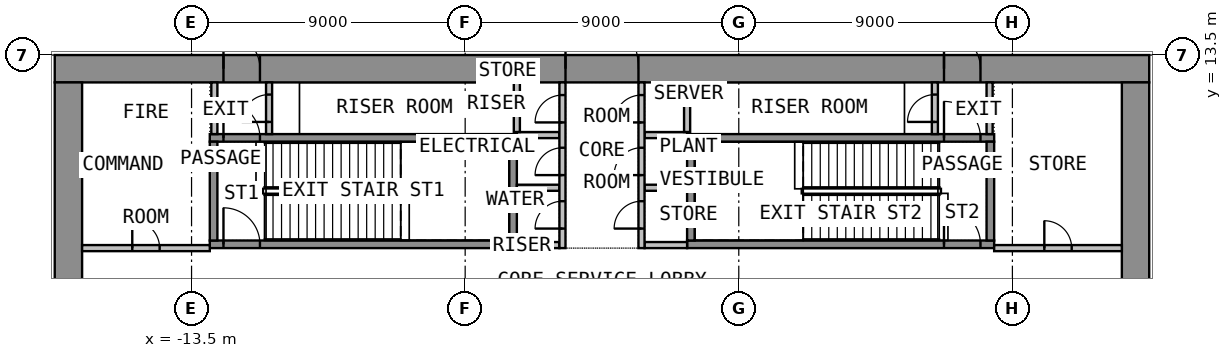
"""IFC4 building model, lengths in metres.
Left out: names, types, materials, properties, quantities, classifications, styles, units other than length and angle.
Written with IfcOpenShell. Run it as: python <this file> out.ifc"""

import sys

from ifc_helpers import new_model, si_unit, direction, frame, frame_2d, origin, place, context, subcontext, project, spatial, rectangle, extrude, element, fill, save


model = new_model("IFC4")
c1 = context("Model", 3, precision=1e-05, world=origin(), true_north=direction((0.0, 1.0)))
c2 = subcontext(c1, "Body", "Model", "MODEL_VIEW")
j1 = project(units=[si_unit("LENGTHUNIT", "METRE"), si_unit("PLANEANGLEUNIT", "RADIAN")], contexts=[c1])
p1 = place(None, origin())
s1 = spatial("IfcSite", under=j1, at=p1, CompositionType="ELEMENT")
p2 = place(p1, origin())
s2 = spatial("IfcBuilding", under=s1, at=p2, CompositionType="ELEMENT")
p3 = place(p2, origin())
s3 = spatial("IfcBuildingStorey", under=s2, at=p3, CompositionType="ELEMENT", Elevation=0.0)
p4 = place(p3, frame((-18.0, 13.05, 0.0), z_axis=(0.0, 0.0, 1.0), x_axis=(1.0, 0.0, 0.0)))
e1 = element("IfcWall", 1, at=p4, inside=s3, PredefinedType="SHEAR", context=c2, shape_type="SweptSolid", body=[
    extrude(rectangle(XDim=36.0, YDim=0.9, at=frame_2d((18.0, 0.0))), origin(), (0.0, 0.0, 1.0), 5.6),
])
p5 = place(p4, frame((16.8, 0.0, 0.0)))
e2 = element("IfcOpeningElement", 2, at=p5, cuts=e1, PredefinedType="OPENING", context=c2, shape_type="SweptSolid", body=[
    extrude(rectangle(XDim=2.4, YDim=2.1, at=frame_2d((1.2, 1.05))), frame((0.0, 0.46, 0.0), z_axis=(0.0, -1.0, 0.0), x_axis=(1.0, 0.0, 0.0)), (0.0, 0.0, 1.0), 0.92),
])
p6 = place(p4, frame((5.55, 0.0, 0.0)))
e3 = element("IfcOpeningElement", 3, at=p6, cuts=e1, PredefinedType="OPENING", context=c2, shape_type="SweptSolid", body=[
    extrude(rectangle(XDim=1.2, YDim=2.1, at=frame_2d((0.6, 1.05))), frame((0.0, 0.46, 0.0), z_axis=(0.0, -1.0, 0.0), x_axis=(1.0, 0.0, 0.0)), (0.0, 0.0, 1.0), 0.92),
])
p7 = place(p4, frame((29.25, 0.0, 0.0)))
e4 = element("IfcOpeningElement", 4, at=p7, cuts=e1, PredefinedType="OPENING", context=c2, shape_type="SweptSolid", body=[
    extrude(rectangle(XDim=1.2, YDim=2.1, at=frame_2d((0.6, 1.05))), frame((0.0, 0.46, 0.0), z_axis=(0.0, -1.0, 0.0), x_axis=(1.0, 0.0, 0.0)), (0.0, 0.0, 1.0), 0.92),
])
p8 = place(p3, frame((-17.55, -12.6, 0.0), z_axis=(0.0, 0.0, 1.0), x_axis=(0.0, 1.0, 0.0)))
e5 = element("IfcWall", 5, at=p8, inside=s3, PredefinedType="SHEAR", context=c2, shape_type="SweptSolid", body=[
    extrude(rectangle(XDim=25.2, YDim=0.9, at=frame_2d((12.6, 0.0))), origin(), (0.0, 0.0, 1.0), 5.6),
])
p9 = place(p8, frame((11.4, 0.0, 0.0)))
e6 = element("IfcOpeningElement", 6, at=p9, cuts=e5, PredefinedType="OPENING", context=c2, shape_type="SweptSolid", body=[
    extrude(rectangle(XDim=2.4, YDim=2.1, at=frame_2d((1.2, 1.05))), frame((0.0, 0.46, 0.0), z_axis=(0.0, -1.0, 0.0), x_axis=(1.0, 0.0, 0.0)), (0.0, 0.0, 1.0), 0.92),
])
p10 = place(p3, frame((17.55, -12.6, 0.0), z_axis=(0.0, 0.0, 1.0), x_axis=(0.0, 1.0, 0.0)))
e7 = element("IfcWall", 7, at=p10, inside=s3, PredefinedType="SHEAR", context=c2, shape_type="SweptSolid", body=[
    extrude(rectangle(XDim=25.2, YDim=0.9, at=frame_2d((12.6, 0.0))), origin(), (0.0, 0.0, 1.0), 5.6),
])
p11 = place(p10, frame((11.4, 0.0, 0.0)))
e8 = element("IfcOpeningElement", 8, at=p11, cuts=e7, PredefinedType="OPENING", context=c2, shape_type="SweptSolid", body=[
    extrude(rectangle(XDim=2.4, YDim=2.1, at=frame_2d((1.2, 1.05))), frame((0.0, 0.46, 0.0), z_axis=(0.0, -1.0, 0.0), x_axis=(1.0, 0.0, 0.0)), (0.0, 0.0, 1.0), 0.92),
])
p12 = place(p3, frame((-12.9, 7.275, 0.0), z_axis=(0.0, 0.0, 1.0), x_axis=(1.0, 0.0, 0.0)))
e9 = element("IfcWall", 9, at=p12, inside=s3, PredefinedType="SHEAR", context=c2, shape_type="SweptSolid", body=[
    extrude(rectangle(XDim=10.1, YDim=0.25, at=frame_2d((5.05, 0.0))), origin(), (0.0, 0.0, 1.0), 5.6),
])
p13 = place(p12, frame((0.45, 0.0, 0.0)))
e10 = element("IfcOpeningElement", 10, at=p13, cuts=e9, PredefinedType="OPENING", context=c2, shape_type="SweptSolid", body=[
    extrude(rectangle(XDim=1.2, YDim=2.1, at=frame_2d((0.6, 1.05))), frame((0.0, 0.135, 0.0), z_axis=(0.0, -1.0, 0.0), x_axis=(1.0, 0.0, 0.0)), (0.0, 0.0, 1.0), 0.27),
])
p14 = place(p3, frame((-12.9, 10.775, 0.0), z_axis=(0.0, 0.0, 1.0), x_axis=(1.0, 0.0, 0.0)))
e11 = element("IfcWall", 11, at=p14, inside=s3, PredefinedType="SHEAR", context=c2, shape_type="SweptSolid", body=[
    extrude(rectangle(XDim=10.1, YDim=0.25, at=frame_2d((5.05, 0.0))), origin(), (0.0, 0.0, 1.0), 5.6),
])
p15 = place(p14, frame((0.45, 0.0, 0.0)))
e12 = element("IfcOpeningElement", 12, at=p15, cuts=e11, PredefinedType="OPENING", context=c2, shape_type="SweptSolid", body=[
    extrude(rectangle(XDim=1.2, YDim=2.1, at=frame_2d((0.6, 1.05))), frame((0.0, 0.135, 0.0), z_axis=(0.0, -1.0, 0.0), x_axis=(1.0, 0.0, 0.0)), (0.0, 0.0, 1.0), 0.27),
])
for number, where, z_axis, x_axis in (
    (13, (-12.775, 7.4, 0.0), (0.0, 0.0, 1.0), (0.0, 1.0, 0.0)),
    (14, (-2.925, 7.4, 0.0), (0.0, 0.0, 1.0), (0.0, 1.0, 0.0)),
):
    element("IfcWall", number, at=place(p3, frame(where, z_axis=z_axis, x_axis=x_axis)), inside=s3, PredefinedType="SHEAR", context=c2, shape_type="SweptSolid", body=[
        extrude(rectangle(XDim=3.25, YDim=0.25, at=frame_2d((1.625, 0.0))), origin(), (0.0, 0.0, 1.0), 5.6),
    ])
p16 = place(p3, frame((2.8, 7.275, 0.0), z_axis=(0.0, 0.0, 1.0), x_axis=(1.0, 0.0, 0.0)))
e15 = element("IfcWall", 15, at=p16, inside=s3, PredefinedType="SHEAR", context=c2, shape_type="SweptSolid", body=[
    extrude(rectangle(XDim=10.1, YDim=0.25, at=frame_2d((5.05, 0.0))), origin(), (0.0, 0.0, 1.0), 5.6),
])
p17 = place(p16, frame((8.45, 0.0, 0.0)))
e16 = element("IfcOpeningElement", 16, at=p17, cuts=e15, PredefinedType="OPENING", context=c2, shape_type="SweptSolid", body=[
    extrude(rectangle(XDim=1.2, YDim=2.1, at=frame_2d((0.6, 1.05))), frame((0.0, 0.135, 0.0), z_axis=(0.0, -1.0, 0.0), x_axis=(1.0, 0.0, 0.0)), (0.0, 0.0, 1.0), 0.27),
])
p18 = place(p3, frame((2.8, 10.775, 0.0), z_axis=(0.0, 0.0, 1.0), x_axis=(1.0, 0.0, 0.0)))
e17 = element("IfcWall", 17, at=p18, inside=s3, PredefinedType="SHEAR", context=c2, shape_type="SweptSolid", body=[
    extrude(rectangle(XDim=10.1, YDim=0.25, at=frame_2d((5.05, 0.0))), origin(), (0.0, 0.0, 1.0), 5.6),
])
p19 = place(p18, frame((8.45, 0.0, 0.0)))
e18 = element("IfcOpeningElement", 18, at=p19, cuts=e17, PredefinedType="OPENING", context=c2, shape_type="SweptSolid", body=[
    extrude(rectangle(XDim=1.2, YDim=2.1, at=frame_2d((0.6, 1.05))), frame((0.0, 0.135, 0.0), z_axis=(0.0, -1.0, 0.0), x_axis=(1.0, 0.0, 0.0)), (0.0, 0.0, 1.0), 0.27),
])
for number, where, z_axis, x_axis in (
    (19, (2.925, 7.4, 0.0), (0.0, 0.0, 1.0), (0.0, 1.0, 0.0)),
    (20, (12.775, 7.4, 0.0), (0.0, 0.0, 1.0), (0.0, 1.0, 0.0)),
):
    element("IfcWall", number, at=place(p3, frame(where, z_axis=z_axis, x_axis=x_axis)), inside=s3, PredefinedType="SHEAR", context=c2, shape_type="SweptSolid", body=[
        extrude(rectangle(XDim=3.25, YDim=0.25, at=frame_2d((1.625, 0.0))), origin(), (0.0, 0.0, 1.0), 5.6),
    ])
for number, where, z_axis, x_axis in (
    (21, (-2.8, 7.25, 0.0), (0.0, 0.0, 1.0), (1.0, 0.0, 0.0)),
    (22, (-2.8, 9.135, 0.0), (0.0, 0.0, 1.0), (1.0, 0.0, 0.0)),
    (23, (-2.8, 10.867, 0.0), (0.0, 0.0, 1.0), (1.0, 0.0, 0.0)),
    (24, (1.4, 7.25, 0.0), (0.0, 0.0, 1.0), (1.0, 0.0, 0.0)),
    (25, (1.4, 9.135, 0.0), (0.0, 0.0, 1.0), (1.0, 0.0, 0.0)),
    (26, (1.4, 10.867, 0.0), (0.0, 0.0, 1.0), (1.0, 0.0, 0.0)),
):
    element("IfcWall", number, at=place(p3, frame(where, z_axis=z_axis, x_axis=x_axis)), inside=s3, PredefinedType="PARTITIONING", context=c2, shape_type="SweptSolid", body=[
        extrude(rectangle(XDim=1.4, YDim=0.2, at=frame_2d((0.7, 0.0))), origin(), (0.0, 0.0, 1.0), 5.6),
    ])
p20 = place(p3, frame((-1.3, 7.15, 0.0), z_axis=(0.0, 0.0, 1.0), x_axis=(0.0, 1.0, 0.0)))
e27 = element("IfcWall", 27, at=p20, inside=s3, PredefinedType="PARTITIONING", context=c2, shape_type="SweptSolid", body=[
    extrude(rectangle(XDim=5.45, YDim=0.2, at=frame_2d((2.725, 0.0))), origin(), (0.0, 0.0, 1.0), 5.6),
])
p21 = place(p20, frame((0.643, 0.0, 0.0)))
e28 = element("IfcOpeningElement", 28, at=p21, cuts=e27, PredefinedType="OPENING", context=c2, shape_type="SweptSolid", body=[
    extrude(rectangle(XDim=0.9, YDim=2.1, at=frame_2d((0.45, 1.05))), frame((0.0, 0.11, 0.0), z_axis=(0.0, -1.0, 0.0), x_axis=(1.0, 0.0, 0.0)), (0.0, 0.0, 1.0), 0.22),
])
p22 = place(p20, frame((2.401, 0.0, 0.0)))
e29 = element("IfcOpeningElement", 29, at=p22, cuts=e27, PredefinedType="OPENING", context=c2, shape_type="SweptSolid", body=[
    extrude(rectangle(XDim=0.9, YDim=2.1, at=frame_2d((0.45, 1.05))), frame((0.0, 0.11, 0.0), z_axis=(0.0, -1.0, 0.0), x_axis=(1.0, 0.0, 0.0)), (0.0, 0.0, 1.0), 0.22),
])
p23 = place(p20, frame((4.134, 0.0, 0.0)))
e30 = element("IfcOpeningElement", 30, at=p23, cuts=e27, PredefinedType="OPENING", context=c2, shape_type="SweptSolid", body=[
    extrude(rectangle(XDim=0.9, YDim=2.1, at=frame_2d((0.45, 1.05))), frame((0.0, 0.11, 0.0), z_axis=(0.0, -1.0, 0.0), x_axis=(1.0, 0.0, 0.0)), (0.0, 0.0, 1.0), 0.22),
])
p24 = place(p3, frame((1.3, 7.15, 0.0), z_axis=(0.0, 0.0, 1.0), x_axis=(0.0, 1.0, 0.0)))
e31 = element("IfcWall", 31, at=p24, inside=s3, PredefinedType="PARTITIONING", context=c2, shape_type="SweptSolid", body=[
    extrude(rectangle(XDim=5.45, YDim=0.2, at=frame_2d((2.725, 0.0))), origin(), (0.0, 0.0, 1.0), 5.6),
])
p25 = place(p24, frame((0.643, 0.0, 0.0)))
e32 = element("IfcOpeningElement", 32, at=p25, cuts=e31, PredefinedType="OPENING", context=c2, shape_type="SweptSolid", body=[
    extrude(rectangle(XDim=0.9, YDim=2.1, at=frame_2d((0.45, 1.05))), frame((0.0, 0.11, 0.0), z_axis=(0.0, -1.0, 0.0), x_axis=(1.0, 0.0, 0.0)), (0.0, 0.0, 1.0), 0.22),
])
p26 = place(p24, frame((2.401, 0.0, 0.0)))
e33 = element("IfcOpeningElement", 33, at=p26, cuts=e31, PredefinedType="OPENING", context=c2, shape_type="SweptSolid", body=[
    extrude(rectangle(XDim=0.9, YDim=2.1, at=frame_2d((0.45, 1.05))), frame((0.0, 0.11, 0.0), z_axis=(0.0, -1.0, 0.0), x_axis=(1.0, 0.0, 0.0)), (0.0, 0.0, 1.0), 0.22),
])
p27 = place(p24, frame((4.134, 0.0, 0.0)))
e34 = element("IfcOpeningElement", 34, at=p27, cuts=e31, PredefinedType="OPENING", context=c2, shape_type="SweptSolid", body=[
    extrude(rectangle(XDim=0.9, YDim=2.1, at=frame_2d((0.45, 1.05))), frame((0.0, 0.11, 0.0), z_axis=(0.0, -1.0, 0.0), x_axis=(1.0, 0.0, 0.0)), (0.0, 0.0, 1.0), 0.22),
])
p28 = place(p3, frame((-12.75, 10.9, 0.0), z_axis=(0.0, 0.0, 1.0), x_axis=(0.0, 1.0, 0.0)))
e35 = element("IfcWall", 35, at=p28, inside=s3, PredefinedType="PARTITIONING", context=c2, shape_type="SweptSolid", body=[
    extrude(rectangle(XDim=1.7, YDim=0.2, at=frame_2d((0.85, 0.0))), origin(), (0.0, 0.0, 1.0), 5.6),
])
p29 = place(p3, frame((-10.95, 10.9, 0.0), z_axis=(0.0, 0.0, 1.0), x_axis=(0.0, 1.0, 0.0)))
e36 = element("IfcWall", 36, at=p29, inside=s3, PredefinedType="PARTITIONING", context=c2, shape_type="SweptSolid", body=[
    extrude(rectangle(XDim=1.7, YDim=0.2, at=frame_2d((0.85, 0.0))), origin(), (0.0, 0.0, 1.0), 5.6),
])
p30 = place(p29, frame((0.4, 0.0, 0.0)))
e37 = element("IfcOpeningElement", 37, at=p30, cuts=e36, PredefinedType="OPENING", context=c2, shape_type="SweptSolid", body=[
    extrude(rectangle(XDim=0.9, YDim=2.1, at=frame_2d((0.45, 1.05))), frame((0.0, 0.11, 0.0), z_axis=(0.0, -1.0, 0.0), x_axis=(1.0, 0.0, 0.0)), (0.0, 0.0, 1.0), 0.22),
])
p31 = place(p3, frame((12.75, 10.9, 0.0), z_axis=(0.0, 0.0, 1.0), x_axis=(0.0, 1.0, 0.0)))
e38 = element("IfcWall", 38, at=p31, inside=s3, PredefinedType="PARTITIONING", context=c2, shape_type="SweptSolid", body=[
    extrude(rectangle(XDim=1.7, YDim=0.2, at=frame_2d((0.85, 0.0))), origin(), (0.0, 0.0, 1.0), 5.6),
])
p32 = place(p3, frame((10.95, 10.9, 0.0), z_axis=(0.0, 0.0, 1.0), x_axis=(0.0, 1.0, 0.0)))
e39 = element("IfcWall", 39, at=p32, inside=s3, PredefinedType="PARTITIONING", context=c2, shape_type="SweptSolid", body=[
    extrude(rectangle(XDim=1.7, YDim=0.2, at=frame_2d((0.85, 0.0))), origin(), (0.0, 0.0, 1.0), 5.6),
])
p33 = place(p32, frame((0.4, 0.0, 0.0)))
e40 = element("IfcOpeningElement", 40, at=p33, cuts=e39, PredefinedType="OPENING", context=c2, shape_type="SweptSolid", body=[
    extrude(rectangle(XDim=0.9, YDim=2.1, at=frame_2d((0.45, 1.05))), frame((0.0, 0.11, 0.0), z_axis=(0.0, -1.0, 0.0), x_axis=(1.0, 0.0, 0.0)), (0.0, 0.0, 1.0), 0.22),
])
p34 = place(p3, frame((-17.1, 7.15, 0.0), z_axis=(0.0, 0.0, 1.0), x_axis=(1.0, 0.0, 0.0)))
e41 = element("IfcWall", 41, at=p34, inside=s3, PredefinedType="PARTITIONING", context=c2, shape_type="SweptSolid", body=[
    extrude(rectangle(XDim=4.2, YDim=0.2, at=frame_2d((2.1, 0.0))), origin(), (0.0, 0.0, 1.0), 5.6),
])
p35 = place(p34, frame((1.65, 0.0, 0.0)))
e42 = element("IfcOpeningElement", 42, at=p35, cuts=e41, PredefinedType="OPENING", context=c2, shape_type="SweptSolid", body=[
    extrude(rectangle(XDim=0.9, YDim=2.1, at=frame_2d((0.45, 1.05))), frame((0.0, 0.11, 0.0), z_axis=(0.0, -1.0, 0.0), x_axis=(1.0, 0.0, 0.0)), (0.0, 0.0, 1.0), 0.22),
])
p36 = place(p3, frame((12.9, 7.15, 0.0), z_axis=(0.0, 0.0, 1.0), x_axis=(1.0, 0.0, 0.0)))
e43 = element("IfcWall", 43, at=p36, inside=s3, PredefinedType="PARTITIONING", context=c2, shape_type="SweptSolid", body=[
    extrude(rectangle(XDim=4.2, YDim=0.2, at=frame_2d((2.1, 0.0))), origin(), (0.0, 0.0, 1.0), 5.6),
])
p37 = place(p36, frame((1.65, 0.0, 0.0)))
e44 = element("IfcOpeningElement", 44, at=p37, cuts=e43, PredefinedType="OPENING", context=c2, shape_type="SweptSolid", body=[
    extrude(rectangle(XDim=0.9, YDim=2.1, at=frame_2d((0.45, 1.05))), frame((0.0, 0.11, 0.0), z_axis=(0.0, -1.0, 0.0), x_axis=(1.0, 0.0, 0.0)), (0.0, 0.0, 1.0), 0.22),
])
for number, where, z_axis, x_axis in (
    (45, (-2.8, 10.969, 0.0), (0.0, 0.0, 1.0), (0.0, 1.0, 0.0)),
    (46, (2.8, 12.599, 0.0), (0.0, 0.0, 1.0), (0.0, -1.0, 0.0)),
):
    element("IfcWall", number, at=place(p3, frame(where, z_axis=z_axis, x_axis=x_axis)), inside=s3, PredefinedType="PARTITIONING", context=c2, shape_type="SweptSolid", body=[
        extrude(rectangle(XDim=1.631, YDim=0.2, at=frame_2d((0.815, 0.0))), origin(), (0.0, 0.0, 1.0), 5.6),
    ])
p38 = place(p5, origin())
e47 = element("IfcDoor", 47, at=p38, inside=s3, OperationType="DOUBLE_DOOR_DOUBLE_SWING", PredefinedType="DOOR", context=c2, shape_type="SweptSolid", body=[
    extrude(rectangle(XDim=2.4, YDim=2.1, at=frame_2d((1.2, 1.05))), frame((0.0, 0.025, 0.0), z_axis=(0.0, -1.0, 0.0), x_axis=(1.0, 0.0, 0.0)), (0.0, 0.0, 1.0), 0.05),
])
fill(e2, e47)
p39 = place(p6, origin())
e48 = element("IfcDoor", 48, at=p39, inside=s3, OperationType="SINGLE_SWING_RIGHT", PredefinedType="DOOR", context=c2, shape_type="SweptSolid", body=[
    extrude(rectangle(XDim=1.2, YDim=2.1, at=frame_2d((0.6, 1.05))), frame((0.0, 0.025, 0.0), z_axis=(0.0, -1.0, 0.0), x_axis=(1.0, 0.0, 0.0)), (0.0, 0.0, 1.0), 0.05),
])
fill(e3, e48)
p40 = place(p7, origin())
e49 = element("IfcDoor", 49, at=p40, inside=s3, OperationType="SINGLE_SWING_RIGHT", PredefinedType="DOOR", context=c2, shape_type="SweptSolid", body=[
    extrude(rectangle(XDim=1.2, YDim=2.1, at=frame_2d((0.6, 1.05))), frame((0.0, 0.025, 0.0), z_axis=(0.0, -1.0, 0.0), x_axis=(1.0, 0.0, 0.0)), (0.0, 0.0, 1.0), 0.05),
])
fill(e4, e49)
p41 = place(p13, origin())
e50 = element("IfcDoor", 50, at=p41, inside=s3, OperationType="SINGLE_SWING_LEFT", PredefinedType="DOOR", context=c2, shape_type="SweptSolid", body=[
    extrude(rectangle(XDim=1.2, YDim=2.1, at=frame_2d((0.6, 1.05))), frame((0.0, 0.025, 0.0), z_axis=(0.0, -1.0, 0.0), x_axis=(1.0, 0.0, 0.0)), (0.0, 0.0, 1.0), 0.05),
])
fill(e10, e50)
p42 = place(p17, origin())
e51 = element("IfcDoor", 51, at=p42, inside=s3, OperationType="SINGLE_SWING_LEFT", PredefinedType="DOOR", context=c2, shape_type="SweptSolid", body=[
    extrude(rectangle(XDim=1.2, YDim=2.1, at=frame_2d((0.6, 1.05))), frame((0.0, 0.025, 0.0), z_axis=(0.0, -1.0, 0.0), x_axis=(1.0, 0.0, 0.0)), (0.0, 0.0, 1.0), 0.05),
])
fill(e16, e51)
p43 = place(p21, origin())
e52 = element("IfcDoor", 52, at=p43, inside=s3, OperationType="SINGLE_SWING_LEFT", PredefinedType="DOOR", context=c2, shape_type="SweptSolid", body=[
    extrude(rectangle(XDim=0.9, YDim=2.1, at=frame_2d((0.45, 1.05))), frame((0.0, 0.025, 0.0), z_axis=(0.0, -1.0, 0.0), x_axis=(1.0, 0.0, 0.0)), (0.0, 0.0, 1.0), 0.05),
])
fill(e28, e52)
p44 = place(p22, origin())
e53 = element("IfcDoor", 53, at=p44, inside=s3, OperationType="SINGLE_SWING_LEFT", PredefinedType="DOOR", context=c2, shape_type="SweptSolid", body=[
    extrude(rectangle(XDim=0.9, YDim=2.1, at=frame_2d((0.45, 1.05))), frame((0.0, 0.025, 0.0), z_axis=(0.0, -1.0, 0.0), x_axis=(1.0, 0.0, 0.0)), (0.0, 0.0, 1.0), 0.05),
])
fill(e29, e53)
p45 = place(p23, origin())
e54 = element("IfcDoor", 54, at=p45, inside=s3, OperationType="SINGLE_SWING_LEFT", PredefinedType="DOOR", context=c2, shape_type="SweptSolid", body=[
    extrude(rectangle(XDim=0.9, YDim=2.1, at=frame_2d((0.45, 1.05))), frame((0.0, 0.025, 0.0), z_axis=(0.0, -1.0, 0.0), x_axis=(1.0, 0.0, 0.0)), (0.0, 0.0, 1.0), 0.05),
])
fill(e30, e54)
p46 = place(p25, origin())
e55 = element("IfcDoor", 55, at=p46, inside=s3, OperationType="SINGLE_SWING_LEFT", PredefinedType="DOOR", context=c2, shape_type="SweptSolid", body=[
    extrude(rectangle(XDim=0.9, YDim=2.1, at=frame_2d((0.45, 1.05))), frame((0.0, 0.025, 0.0), z_axis=(0.0, -1.0, 0.0), x_axis=(1.0, 0.0, 0.0)), (0.0, 0.0, 1.0), 0.05),
])
fill(e32, e55)
p47 = place(p26, origin())
e56 = element("IfcDoor", 56, at=p47, inside=s3, OperationType="SINGLE_SWING_LEFT", PredefinedType="DOOR", context=c2, shape_type="SweptSolid", body=[
    extrude(rectangle(XDim=0.9, YDim=2.1, at=frame_2d((0.45, 1.05))), frame((0.0, 0.025, 0.0), z_axis=(0.0, -1.0, 0.0), x_axis=(1.0, 0.0, 0.0)), (0.0, 0.0, 1.0), 0.05),
])
fill(e33, e56)
p48 = place(p27, origin())
e57 = element("IfcDoor", 57, at=p48, inside=s3, OperationType="SINGLE_SWING_LEFT", PredefinedType="DOOR", context=c2, shape_type="SweptSolid", body=[
    extrude(rectangle(XDim=0.9, YDim=2.1, at=frame_2d((0.45, 1.05))), frame((0.0, 0.025, 0.0), z_axis=(0.0, -1.0, 0.0), x_axis=(1.0, 0.0, 0.0)), (0.0, 0.0, 1.0), 0.05),
])
fill(e34, e57)
p49 = place(p15, origin())
e58 = element("IfcDoor", 58, at=p49, inside=s3, OperationType="SINGLE_SWING_RIGHT", PredefinedType="DOOR", context=c2, shape_type="SweptSolid", body=[
    extrude(rectangle(XDim=1.2, YDim=2.1, at=frame_2d((0.6, 1.05))), frame((0.0, 0.025, 0.0), z_axis=(0.0, -1.0, 0.0), x_axis=(1.0, 0.0, 0.0)), (0.0, 0.0, 1.0), 0.05),
])
fill(e12, e58)
p50 = place(p30, origin())
e59 = element("IfcDoor", 59, at=p50, inside=s3, OperationType="SINGLE_SWING_LEFT", PredefinedType="DOOR", context=c2, shape_type="SweptSolid", body=[
    extrude(rectangle(XDim=0.9, YDim=2.1, at=frame_2d((0.45, 1.05))), frame((0.0, 0.025, 0.0), z_axis=(0.0, -1.0, 0.0), x_axis=(1.0, 0.0, 0.0)), (0.0, 0.0, 1.0), 0.05),
])
fill(e37, e59)
p51 = place(p19, origin())
e60 = element("IfcDoor", 60, at=p51, inside=s3, OperationType="SINGLE_SWING_RIGHT", PredefinedType="DOOR", context=c2, shape_type="SweptSolid", body=[
    extrude(rectangle(XDim=1.2, YDim=2.1, at=frame_2d((0.6, 1.05))), frame((0.0, 0.025, 0.0), z_axis=(0.0, -1.0, 0.0), x_axis=(1.0, 0.0, 0.0)), (0.0, 0.0, 1.0), 0.05),
])
fill(e18, e60)
p52 = place(p33, origin())
e61 = element("IfcDoor", 61, at=p52, inside=s3, OperationType="SINGLE_SWING_LEFT", PredefinedType="DOOR", context=c2, shape_type="SweptSolid", body=[
    extrude(rectangle(XDim=0.9, YDim=2.1, at=frame_2d((0.45, 1.05))), frame((0.0, 0.025, 0.0), z_axis=(0.0, -1.0, 0.0), x_axis=(1.0, 0.0, 0.0)), (0.0, 0.0, 1.0), 0.05),
])
fill(e40, e61)
p53 = place(p35, origin())
e62 = element("IfcDoor", 62, at=p53, inside=s3, OperationType="SINGLE_SWING_LEFT", PredefinedType="DOOR", context=c2, shape_type="SweptSolid", body=[
    extrude(rectangle(XDim=0.9, YDim=2.1, at=frame_2d((0.45, 1.05))), frame((0.0, 0.025, 0.0), z_axis=(0.0, -1.0, 0.0), x_axis=(1.0, 0.0, 0.0)), (0.0, 0.0, 1.0), 0.05),
])
fill(e42, e62)
p54 = place(p37, origin())
e63 = element("IfcDoor", 63, at=p54, inside=s3, OperationType="SINGLE_SWING_LEFT", PredefinedType="DOOR", context=c2, shape_type="SweptSolid", body=[
    extrude(rectangle(XDim=0.9, YDim=2.1, at=frame_2d((0.45, 1.05))), frame((0.0, 0.025, 0.0), z_axis=(0.0, -1.0, 0.0), x_axis=(1.0, 0.0, 0.0)), (0.0, 0.0, 1.0), 0.05),
])
fill(e44, e63)
save(model, sys.argv[1])
